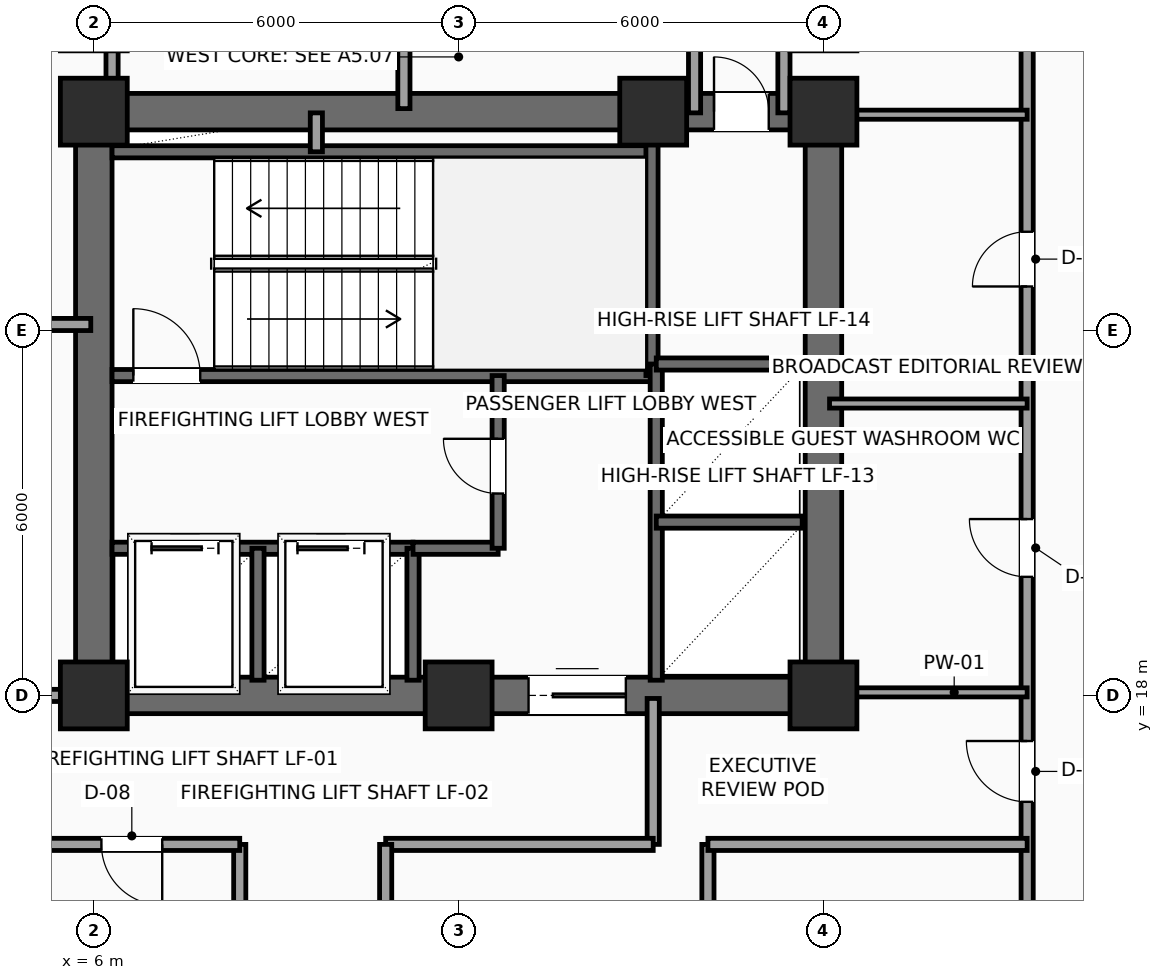
"""IFC4 building model, lengths in metres.
Left out: names, types, materials, properties, quantities, classifications, styles, units other than length and angle.
Written with IfcOpenShell. Run it as: python <this file> out.ifc"""

import sys

from ifc_helpers import new_model, si_unit, direction, frame, frame_2d, origin, origin_2d, place, context, subcontext, project, spatial, rectangle, extrude, element, fill, save


model = new_model("IFC4")
c1 = context("Model", 3, precision=1e-05, world=origin(), true_north=direction((0.0, 1.0)))
c2 = subcontext(c1, "Body", "Model", "MODEL_VIEW")
j1 = project(units=[si_unit("LENGTHUNIT", "METRE"), si_unit("PLANEANGLEUNIT", "RADIAN")], contexts=[c1])
p1 = place(None, origin())
s1 = spatial("IfcSite", under=j1, at=p1, CompositionType="ELEMENT")
p2 = place(p1, origin())
s2 = spatial("IfcBuilding", under=s1, at=p2, CompositionType="ELEMENT")
p3 = place(p2, frame((0.0, 0.0, 123.15)))
s3 = spatial("IfcBuildingStorey", under=s2, at=p3, CompositionType="ELEMENT", Elevation=123.15)
for number, where, z_axis, x_axis in (
    (1, (6.0, 18.0, 0.0), (0.0, 0.0, 1.0), (1.0, 0.0, 0.0)),
    (2, (12.0, 18.0, 0.0), (0.0, 0.0, 1.0), (1.0, 0.0, 0.0)),
    (3, (18.0, 18.0, 0.0), (0.0, 0.0, 1.0), (1.0, 0.0, 0.0)),
    (4, (6.0, 27.6, 0.0), (0.0, 0.0, 1.0), (1.0, 0.0, 0.0)),
    (5, (15.2, 27.6, 0.0), (0.0, 0.0, 1.0), (1.0, 0.0, 0.0)),
    (6, (18.0, 27.6, 0.0), (0.0, 0.0, 1.0), (1.0, 0.0, 0.0)),
):
    element("IfcColumn", number, at=place(p3, frame(where, z_axis=z_axis, x_axis=x_axis)), inside=s3, PredefinedType="COLUMN", context=c2, shape_type="SweptSolid", body=[
        extrude(rectangle(XDim=1.1, YDim=1.1, at=origin_2d()), origin(), (0.0, 0.0, 1.0), 3.75),
    ])
p4 = place(p3, frame((6.0, 18.0, 0.0), z_axis=(0.0, 0.0, 1.0), x_axis=(1.0, 0.0, 0.0)))
e7 = element("IfcWall", 7, at=p4, inside=s3, PredefinedType="SHEAR", context=c2, shape_type="SweptSolid", body=[
    extrude(rectangle(XDim=12.0, YDim=0.6, at=frame_2d((6.0, 0.0))), origin(), (0.0, 0.0, 1.0), 3.525),
])
p5 = place(p4, frame((7.15, 0.0, 0.0)))
e8 = element("IfcOpeningElement", 8, at=p5, cuts=e7, PredefinedType="OPENING", context=c2, shape_type="SweptSolid", body=[
    extrude(rectangle(XDim=1.6, YDim=2.3, at=frame_2d((0.8, 1.15))), frame((0.0, 0.31, 0.0), z_axis=(0.0, -1.0, 0.0), x_axis=(1.0, 0.0, 0.0)), (0.0, 0.0, 1.0), 0.62),
])
p6 = place(p3, frame((6.0, 27.6, 0.0), z_axis=(0.0, 0.0, 1.0), x_axis=(1.0, 0.0, 0.0)))
e9 = element("IfcWall", 9, at=p6, inside=s3, PredefinedType="SHEAR", context=c2, shape_type="SweptSolid", body=[
    extrude(rectangle(XDim=12.0, YDim=0.6, at=frame_2d((6.0, 0.0))), origin(), (0.0, 0.0, 1.0), 3.525),
])
p7 = place(p6, frame((10.2, 0.0, 0.0)))
e10 = element("IfcOpeningElement", 10, at=p7, cuts=e9, PredefinedType="OPENING", context=c2, shape_type="SweptSolid", body=[
    extrude(rectangle(XDim=0.9, YDim=2.15, at=frame_2d((0.45, 1.075))), frame((0.0, 0.31, 0.0), z_axis=(0.0, -1.0, 0.0), x_axis=(1.0, 0.0, 0.0)), (0.0, 0.0, 1.0), 0.62),
])
for number, where, z_axis, x_axis in (
    (11, (6.0, 18.0, 0.0), (0.0, 0.0, 1.0), (0.0, 1.0, 0.0)),
    (12, (18.0, 18.0, 0.0), (0.0, 0.0, 1.0), (0.0, 1.0, 0.0)),
):
    element("IfcWall", number, at=place(p3, frame(where, z_axis=z_axis, x_axis=x_axis)), inside=s3, PredefinedType="SHEAR", context=c2, shape_type="SweptSolid", body=[
        extrude(rectangle(XDim=9.6, YDim=0.6, at=frame_2d((4.8, 0.0))), origin(), (0.0, 0.0, 1.0), 3.525),
    ])
p8 = place(p3, frame((6.3, 23.26, 0.0), z_axis=(0.0, 0.0, 1.0), x_axis=(1.0, 0.0, 0.0)))
e13 = element("IfcWall", 13, at=p8, inside=s3, PredefinedType="SHEAR", context=c2, shape_type="SweptSolid", body=[
    extrude(rectangle(XDim=8.88, YDim=0.2, at=frame_2d((4.44, 0.0))), origin(), (0.0, 0.0, 1.0), 3.525),
])
p9 = place(p8, frame((0.35, 0.0, 0.0)))
e14 = element("IfcOpeningElement", 14, at=p9, cuts=e13, PredefinedType="OPENING", context=c2, shape_type="SweptSolid", body=[
    extrude(rectangle(XDim=1.1, YDim=2.2, at=frame_2d((0.55, 1.1))), frame((0.0, 0.11, 0.0), z_axis=(0.0, -1.0, 0.0), x_axis=(1.0, 0.0, 0.0)), (0.0, 0.0, 1.0), 0.22),
])
p10 = place(p3, frame((6.3, 26.94, 0.0), z_axis=(0.0, 0.0, 1.0), x_axis=(1.0, 0.0, 0.0)))
e15 = element("IfcWall", 15, at=p10, inside=s3, PredefinedType="SHEAR", context=c2, shape_type="SweptSolid", body=[
    extrude(rectangle(XDim=8.88, YDim=0.2, at=frame_2d((4.44, 0.0))), origin(), (0.0, 0.0, 1.0), 3.525),
])
p11 = place(p3, frame((15.18, 23.26, 0.0), z_axis=(0.0, 0.0, 1.0), x_axis=(0.0, 1.0, 0.0)))
e16 = element("IfcWall", 16, at=p11, inside=s3, PredefinedType="SHEAR", context=c2, shape_type="SweptSolid", body=[
    extrude(rectangle(XDim=4.04, YDim=0.2, at=frame_2d((2.02, 0.0))), origin(), (0.0, 0.0, 1.0), 3.525),
])
p12 = place(p3, frame((6.3, 20.42, 0.0), z_axis=(0.0, 0.0, 1.0), x_axis=(1.0, 0.0, 0.0)))
e17 = element("IfcWall", 17, at=p12, inside=s3, PredefinedType="SHEAR", context=c2, shape_type="SweptSolid", body=[
    extrude(rectangle(XDim=4.95, YDim=0.2, at=frame_2d((2.475, 0.0))), origin(), (0.0, 0.0, 1.0), 3.525),
])
p13 = place(p12, frame((0.65, 0.0, 0.0)))
e18 = element("IfcOpeningElement", 18, at=p13, cuts=e17, PredefinedType="OPENING", context=c2, shape_type="SweptSolid", body=[
    extrude(rectangle(XDim=1.1, YDim=2.2, at=frame_2d((0.55, 1.1))), frame((0.0, 0.11, 0.0), z_axis=(0.0, -1.0, 0.0), x_axis=(1.0, 0.0, 0.0)), (0.0, 0.0, 1.0), 0.22),
])
p14 = place(p12, frame((3.05, 0.0, 0.0)))
e19 = element("IfcOpeningElement", 19, at=p14, cuts=e17, PredefinedType="OPENING", context=c2, shape_type="SweptSolid", body=[
    extrude(rectangle(XDim=1.1, YDim=2.2, at=frame_2d((0.55, 1.1))), frame((0.0, 0.11, 0.0), z_axis=(0.0, -1.0, 0.0), x_axis=(1.0, 0.0, 0.0)), (0.0, 0.0, 1.0), 0.22),
])
for number, where, z_axis, x_axis in (
    (20, (8.7, 18.25, 0.0), (0.0, 0.0, 1.0), (0.0, 1.0, 0.0)),
    (21, (11.25, 18.25, 0.0), (0.0, 0.0, 1.0), (0.0, 1.0, 0.0)),
):
    element("IfcWall", number, at=place(p3, frame(where, z_axis=z_axis, x_axis=x_axis)), inside=s3, PredefinedType="SHEAR", context=c2, shape_type="SweptSolid", body=[
        extrude(rectangle(XDim=2.17, YDim=0.2, at=frame_2d((1.085, 0.0))), origin(), (0.0, 0.0, 1.0), 3.525),
    ])
p15 = place(p3, frame((11.25, 20.42, 0.0), z_axis=(0.0, 0.0, 1.0), x_axis=(1.0, 0.0, 0.0)))
e22 = element("IfcWall", 22, at=p15, inside=s3, PredefinedType="SHEAR", context=c2, shape_type="SweptSolid", body=[
    extrude(rectangle(XDim=1.4, YDim=0.2, at=frame_2d((0.7, 0.0))), origin(), (0.0, 0.0, 1.0), 3.525),
])
p16 = place(p3, frame((12.65, 20.42, 0.0), z_axis=(0.0, 0.0, 1.0), x_axis=(0.0, 1.0, 0.0)))
e23 = element("IfcWall", 23, at=p16, inside=s3, PredefinedType="SHEAR", context=c2, shape_type="SweptSolid", body=[
    extrude(rectangle(XDim=2.84, YDim=0.2, at=frame_2d((1.42, 0.0))), origin(), (0.0, 0.0, 1.0), 3.525),
])
p17 = place(p16, frame((0.9, 0.0, 0.0)))
e24 = element("IfcOpeningElement", 24, at=p17, cuts=e23, PredefinedType="OPENING", context=c2, shape_type="SweptSolid", body=[
    extrude(rectangle(XDim=0.9, YDim=2.15, at=frame_2d((0.45, 1.075))), frame((0.0, 0.11, 0.0), z_axis=(0.0, -1.0, 0.0), x_axis=(1.0, 0.0, 0.0)), (0.0, 0.0, 1.0), 0.22),
])
p18 = place(p3, frame((9.66, 26.94, 0.0), z_axis=(0.0, 0.0, 1.0), x_axis=(0.0, 1.0, 0.0)))
e25 = element("IfcWall", 25, at=p18, inside=s3, PredefinedType="SOLIDWALL", context=c2, shape_type="SweptSolid", body=[
    extrude(rectangle(XDim=0.64, YDim=0.2, at=frame_2d((0.32, 0.0))), origin(), (0.0, 0.0, 1.0), 3.525),
])
p19 = place(p3, frame((15.25, 18.25, 0.0), z_axis=(0.0, 0.0, 1.0), x_axis=(0.0, 1.0, 0.0)))
e26 = element("IfcWall", 26, at=p19, inside=s3, PredefinedType="SHEAR", context=c2, shape_type="SweptSolid", body=[
    extrude(rectangle(XDim=5.2, YDim=0.2, at=frame_2d((2.6, 0.0))), origin(), (0.0, 0.0, 1.0), 3.525),
])
p20 = place(p3, frame((15.25, 20.85, 0.0), z_axis=(0.0, 0.0, 1.0), x_axis=(1.0, 0.0, 0.0)))
e27 = element("IfcWall", 27, at=p20, inside=s3, PredefinedType="SHEAR", context=c2, shape_type="SweptSolid", body=[
    extrude(rectangle(XDim=2.4, YDim=0.2, at=frame_2d((1.2, 0.0))), origin(), (0.0, 0.0, 1.0), 3.525),
])
p21 = place(p3, frame((15.25, 23.45, 0.0), z_axis=(0.0, 0.0, 1.0), x_axis=(1.0, 0.0, 0.0)))
e28 = element("IfcWall", 28, at=p21, inside=s3, PredefinedType="SHEAR", context=c2, shape_type="SweptSolid", body=[
    extrude(rectangle(XDim=2.45, YDim=0.2, at=frame_2d((1.225, 0.0))), origin(), (0.0, 0.0, 1.0), 3.525),
])
p22 = place(p3, frame((8.4, 11.25, 0.0), z_axis=(0.0, 0.0, 1.0), x_axis=(0.0, 1.0, 0.0)))
e29 = element("IfcWall", 29, at=p22, inside=s3, PredefinedType="SOLIDWALL", context=c2, shape_type="SweptSolid", body=[
    extrude(rectangle(XDim=4.3, YDim=0.2, at=frame_2d((2.15, 0.0))), origin(), (0.0, 0.0, 1.0), 3.525),
])
p23 = place(p3, frame((8.4, 15.55, 0.0), z_axis=(0.0, 0.0, 1.0), x_axis=(-1.0, 0.0, 0.0)))
e30 = element("IfcWall", 30, at=p23, inside=s3, PredefinedType="SOLIDWALL", context=c2, shape_type="SweptSolid", body=[
    extrude(rectangle(XDim=8.1, YDim=0.2, at=frame_2d((4.05, 0.0))), origin(), (0.0, 0.0, 1.0), 3.525),
])
p24 = place(p23, frame((5.3, 0.0, 0.0)))
e31 = element("IfcOpeningElement", 31, at=p24, cuts=e30, PredefinedType="OPENING", context=c2, shape_type="SweptSolid", body=[
    extrude(rectangle(XDim=1.0, YDim=2.2, at=frame_2d((0.5, 1.1))), frame((0.0, 0.11, 0.0), z_axis=(0.0, -1.0, 0.0), x_axis=(1.0, 0.0, 0.0)), (0.0, 0.0, 1.0), 0.22),
])
p25 = place(p23, frame((1.275, 0.0, 0.0)))
e32 = element("IfcOpeningElement", 32, at=p25, cuts=e30, PredefinedType="OPENING", context=c2, shape_type="SweptSolid", body=[
    extrude(rectangle(XDim=1.0, YDim=2.2, at=frame_2d((0.5, 1.1))), frame((0.0, 0.11, 0.0), z_axis=(0.0, -1.0, 0.0), x_axis=(1.0, 0.0, 0.0)), (0.0, 0.0, 1.0), 0.22),
])
p26 = place(p3, frame((15.2, 17.95, 0.0), z_axis=(0.0, 0.0, 1.0), x_axis=(0.0, -1.0, 0.0)))
e33 = element("IfcWall", 33, at=p26, inside=s3, PredefinedType="SOLIDWALL", context=c2, shape_type="SweptSolid", body=[
    extrude(rectangle(XDim=2.4, YDim=0.2, at=frame_2d((1.2, 0.0))), origin(), (0.0, 0.0, 1.0), 3.525),
])
p27 = place(p3, frame((15.2, 15.55, 0.0), z_axis=(0.0, 0.0, 1.0), x_axis=(-1.0, 0.0, 0.0)))
e34 = element("IfcWall", 34, at=p27, inside=s3, PredefinedType="SOLIDWALL", context=c2, shape_type="SweptSolid", body=[
    extrude(rectangle(XDim=4.4, YDim=0.2, at=frame_2d((2.2, 0.0))), origin(), (0.0, 0.0, 1.0), 3.525),
])
p28 = place(p3, frame((10.8, 15.55, 0.0), z_axis=(0.0, 0.0, 1.0), x_axis=(0.0, -1.0, 0.0)))
e35 = element("IfcWall", 35, at=p28, inside=s3, PredefinedType="SOLIDWALL", context=c2, shape_type="SweptSolid", body=[
    extrude(rectangle(XDim=4.3, YDim=0.2, at=frame_2d((2.15, 0.0))), origin(), (0.0, 0.0, 1.0), 3.525),
])
p29 = place(p3, frame((21.35, 11.25, 0.0), z_axis=(0.0, 0.0, 1.0), x_axis=(0.0, 1.0, 0.0)))
e36 = element("IfcWall", 36, at=p29, inside=s3, PredefinedType="SOLIDWALL", context=c2, shape_type="SweptSolid", body=[
    extrude(rectangle(XDim=19.0, YDim=0.2, at=frame_2d((9.5, 0.0))), origin(), (0.0, 0.0, 1.0), 3.525),
])
p30 = place(p29, frame((8.7, 0.0, 0.0)))
e37 = element("IfcOpeningElement", 37, at=p30, cuts=e36, PredefinedType="OPENING", context=c2, shape_type="SweptSolid", body=[
    extrude(rectangle(XDim=0.95, YDim=2.15, at=frame_2d((0.475, 1.075))), frame((0.0, 0.11, 0.0), z_axis=(0.0, -1.0, 0.0), x_axis=(1.0, 0.0, 0.0)), (0.0, 0.0, 1.0), 0.22),
])
p31 = place(p29, frame((13.475, 0.0, 0.0)))
e38 = element("IfcOpeningElement", 38, at=p31, cuts=e36, PredefinedType="OPENING", context=c2, shape_type="SweptSolid", body=[
    extrude(rectangle(XDim=0.9, YDim=2.1, at=frame_2d((0.45, 1.05))), frame((0.0, 0.11, 0.0), z_axis=(0.0, -1.0, 0.0), x_axis=(1.0, 0.0, 0.0)), (0.0, 0.0, 1.0), 0.22),
])
p32 = place(p29, frame((5.0, 0.0, 0.0)))
e39 = element("IfcOpeningElement", 39, at=p32, cuts=e36, PredefinedType="OPENING", context=c2, shape_type="SweptSolid", body=[
    extrude(rectangle(XDim=1.0, YDim=2.2, at=frame_2d((0.5, 1.1))), frame((0.0, 0.11, 0.0), z_axis=(0.0, -1.0, 0.0), x_axis=(1.0, 0.0, 0.0)), (0.0, 0.0, 1.0), 0.22),
])
for number, where, z_axis, x_axis in (
    (40, (17.35, 30.25, 0.0), (0.0, 0.0, 1.0), (0.0, -1.0, 0.0)),
    (41, (15.88, 27.58, 0.0), (0.0, 0.0, 1.0), (0.0, 1.0, 0.0)),
):
    element("IfcWall", number, at=place(p3, frame(where, z_axis=z_axis, x_axis=x_axis)), inside=s3, PredefinedType="SOLIDWALL", context=c2, shape_type="SweptSolid", body=[
        extrude(rectangle(XDim=2.67, YDim=0.2, at=frame_2d((1.335, 0.0))), origin(), (0.0, 0.0, 1.0), 3.525),
    ])
p33 = place(p3, frame((16.1, 11.25, 0.0), z_axis=(0.0, 0.0, 1.0), x_axis=(0.0, 1.0, 0.0)))
e42 = element("IfcWall", 42, at=p33, inside=s3, PredefinedType="PARTITIONING", context=c2, shape_type="SweptSolid", body=[
    extrude(rectangle(XDim=4.3, YDim=0.2, at=frame_2d((2.15, 0.0))), origin(), (0.0, 0.0, 1.0), 3.525),
])
p34 = place(p3, frame((16.1, 15.55, 0.0), z_axis=(0.0, 0.0, 1.0), x_axis=(1.0, 0.0, 0.0)))
e43 = element("IfcWall", 43, at=p34, inside=s3, PredefinedType="PARTITIONING", context=c2, shape_type="SweptSolid", body=[
    extrude(rectangle(XDim=5.25, YDim=0.2, at=frame_2d((2.625, 0.0))), origin(), (0.0, 0.0, 1.0), 3.525),
])
p35 = place(p3, frame((18.1, 18.05, 0.0), z_axis=(0.0, 0.0, 1.0), x_axis=(1.0, 0.0, 0.0)))
e44 = element("IfcWall", 44, at=p35, inside=s3, PredefinedType="PARTITIONING", context=c2, shape_type="SweptSolid", body=[
    extrude(rectangle(XDim=3.25, YDim=0.15, at=frame_2d((1.625, 0.0))), origin(), (0.0, 0.0, 1.0), 3.017),
])
for number, where, z_axis, x_axis in (
    (45, (18.1, 22.8, 0.0), (0.0, 0.0, 1.0), (1.0, 0.0, 0.0)),
    (46, (18.1, 27.55, 0.0), (0.0, 0.0, 1.0), (1.0, 0.0, 0.0)),
):
    element("IfcWall", number, at=place(p3, frame(where, z_axis=z_axis, x_axis=x_axis)), inside=s3, PredefinedType="PARTITIONING", context=c2, shape_type="SweptSolid", body=[
        extrude(rectangle(XDim=3.25, YDim=0.15, at=frame_2d((1.625, 0.0))), origin(), (0.0, 0.0, 1.0), 3.525),
    ])
p36 = place(p3, frame((0.3, 18.0, 0.0), z_axis=(0.0, 0.0, 1.0), x_axis=(1.0, 0.0, 0.0)))
e47 = element("IfcWall", 47, at=p36, inside=s3, PredefinedType="PARTITIONING", context=c2, shape_type="SweptSolid", body=[
    extrude(rectangle(XDim=5.65, YDim=0.2, at=frame_2d((2.825, 0.0))), origin(), (0.0, 0.0, 1.0), 3.017),
])
p37 = place(p36, frame((2.35, 0.0, 0.0)))
e48 = element("IfcOpeningElement", 48, at=p37, cuts=e47, PredefinedType="OPENING", context=c2, shape_type="SweptSolid", body=[
    extrude(rectangle(XDim=1.0, YDim=2.2, at=frame_2d((0.5, 1.1))), frame((0.0, 0.11, 0.0), z_axis=(0.0, -1.0, 0.0), x_axis=(1.0, 0.0, 0.0)), (0.0, 0.0, 1.0), 0.22),
])
p38 = place(p3, frame((0.3, 24.1, 0.0), z_axis=(0.0, 0.0, 1.0), x_axis=(1.0, 0.0, 0.0)))
e49 = element("IfcWall", 49, at=p38, inside=s3, PredefinedType="PARTITIONING", context=c2, shape_type="SweptSolid", body=[
    extrude(rectangle(XDim=5.65, YDim=0.2, at=frame_2d((2.825, 0.0))), origin(), (0.0, 0.0, 1.0), 3.525),
])
p39 = place(p3, frame((6.3, 27.65, 0.0), z_axis=(0.0, 0.0, 1.0), x_axis=(0.0, 1.0, 0.0)))
e50 = element("IfcWall", 50, at=p39, inside=s3, PredefinedType="PARTITIONING", context=c2, shape_type="SweptSolid", body=[
    extrude(rectangle(XDim=2.6, YDim=0.2, at=frame_2d((1.3, 0.0))), origin(), (0.0, 0.0, 1.0), 3.017),
])
p40 = place(p3, frame((11.1, 27.65, 0.0), z_axis=(0.0, 0.0, 1.0), x_axis=(0.0, 1.0, 0.0)))
e51 = element("IfcWall", 51, at=p40, inside=s3, PredefinedType="PARTITIONING", context=c2, shape_type="SweptSolid", body=[
    extrude(rectangle(XDim=2.6, YDim=0.2, at=frame_2d((1.3, 0.0))), origin(), (0.0, 0.0, 1.0), 3.525),
])
p41 = place(p5, origin())
e52 = element("IfcDoor", 52, at=p41, inside=s3, OperationType="DOUBLE_DOOR_SLIDING", PredefinedType="DOOR", context=c2, shape_type="SweptSolid", body=[
    extrude(rectangle(XDim=1.6, YDim=2.3, at=frame_2d((0.8, 1.15))), frame((0.0, 0.025, 0.0), z_axis=(0.0, -1.0, 0.0), x_axis=(1.0, 0.0, 0.0)), (0.0, 0.0, 1.0), 0.05),
])
fill(e8, e52)
p42 = place(p7, origin())
e53 = element("IfcDoor", 53, at=p42, inside=s3, OperationType="SINGLE_SWING_LEFT", PredefinedType="DOOR", context=c2, shape_type="SweptSolid", body=[
    extrude(rectangle(XDim=0.9, YDim=2.15, at=frame_2d((0.45, 1.075))), frame((0.0, 0.025, 0.0), z_axis=(0.0, -1.0, 0.0), x_axis=(1.0, 0.0, 0.0)), (0.0, 0.0, 1.0), 0.05),
])
fill(e10, e53)
p43 = place(p9, origin())
e54 = element("IfcDoor", 54, at=p43, inside=s3, OperationType="SINGLE_SWING_LEFT", PredefinedType="DOOR", context=c2, shape_type="SweptSolid", body=[
    extrude(rectangle(XDim=1.1, YDim=2.2, at=frame_2d((0.55, 1.1))), frame((0.0, 0.025, 0.0), z_axis=(0.0, -1.0, 0.0), x_axis=(1.0, 0.0, 0.0)), (0.0, 0.0, 1.0), 0.05),
])
fill(e14, e54)
p44 = place(p13, origin())
e55 = element("IfcDoor", 55, at=p44, inside=s3, OperationType="SLIDING_TO_LEFT", PredefinedType="DOOR", context=c2, shape_type="SweptSolid", body=[
    extrude(rectangle(XDim=1.1, YDim=2.2, at=frame_2d((0.55, 1.1))), frame((0.0, 0.025, 0.0), z_axis=(0.0, -1.0, 0.0), x_axis=(1.0, 0.0, 0.0)), (0.0, 0.0, 1.0), 0.05),
])
fill(e18, e55)
p45 = place(p14, origin())
e56 = element("IfcDoor", 56, at=p45, inside=s3, OperationType="SLIDING_TO_LEFT", PredefinedType="DOOR", context=c2, shape_type="SweptSolid", body=[
    extrude(rectangle(XDim=1.1, YDim=2.2, at=frame_2d((0.55, 1.1))), frame((0.0, 0.025, 0.0), z_axis=(0.0, -1.0, 0.0), x_axis=(1.0, 0.0, 0.0)), (0.0, 0.0, 1.0), 0.05),
])
fill(e19, e56)
p46 = place(p17, origin())
e57 = element("IfcDoor", 57, at=p46, inside=s3, OperationType="SINGLE_SWING_RIGHT", PredefinedType="DOOR", context=c2, shape_type="SweptSolid", body=[
    extrude(rectangle(XDim=0.9, YDim=2.15, at=frame_2d((0.45, 1.075))), frame((0.0, 0.025, 0.0), z_axis=(0.0, -1.0, 0.0), x_axis=(1.0, 0.0, 0.0)), (0.0, 0.0, 1.0), 0.05),
])
fill(e24, e57)
p47 = place(p25, origin())
e58 = element("IfcDoor", 58, at=p47, inside=s3, OperationType="SINGLE_SWING_LEFT", PredefinedType="DOOR", context=c2, shape_type="SweptSolid", body=[
    extrude(rectangle(XDim=1.0, YDim=2.2, at=frame_2d((0.5, 1.1))), frame((0.0, 0.025, 0.0), z_axis=(0.0, -1.0, 0.0), x_axis=(1.0, 0.0, 0.0)), (0.0, 0.0, 1.0), 0.05),
])
fill(e32, e58)
p48 = place(p30, origin())
e59 = element("IfcDoor", 59, at=p48, inside=s3, OperationType="SINGLE_SWING_RIGHT", PredefinedType="DOOR", context=c2, shape_type="SweptSolid", body=[
    extrude(rectangle(XDim=0.95, YDim=2.15, at=frame_2d((0.475, 1.075))), frame((0.0, 0.025, 0.0), z_axis=(0.0, -1.0, 0.0), x_axis=(1.0, 0.0, 0.0)), (0.0, 0.0, 1.0), 0.05),
])
fill(e37, e59)
p49 = place(p31, origin())
e60 = element("IfcDoor", 60, at=p49, inside=s3, OperationType="SINGLE_SWING_LEFT", PredefinedType="DOOR", context=c2, shape_type="SweptSolid", body=[
    extrude(rectangle(XDim=0.9, YDim=2.1, at=frame_2d((0.45, 1.05))), frame((0.0, 0.025, 0.0), z_axis=(0.0, -1.0, 0.0), x_axis=(1.0, 0.0, 0.0)), (0.0, 0.0, 1.0), 0.05),
])
fill(e38, e60)
p50 = place(p32, origin())
e61 = element("IfcDoor", 61, at=p50, inside=s3, OperationType="SINGLE_SWING_RIGHT", PredefinedType="DOOR", context=c2, shape_type="SweptSolid", body=[
    extrude(rectangle(XDim=1.0, YDim=2.2, at=frame_2d((0.5, 1.1))), frame((0.0, 0.025, 0.0), z_axis=(0.0, -1.0, 0.0), x_axis=(1.0, 0.0, 0.0)), (0.0, 0.0, 1.0), 0.05),
])
fill(e39, e61)
save(model, sys.argv[1])
